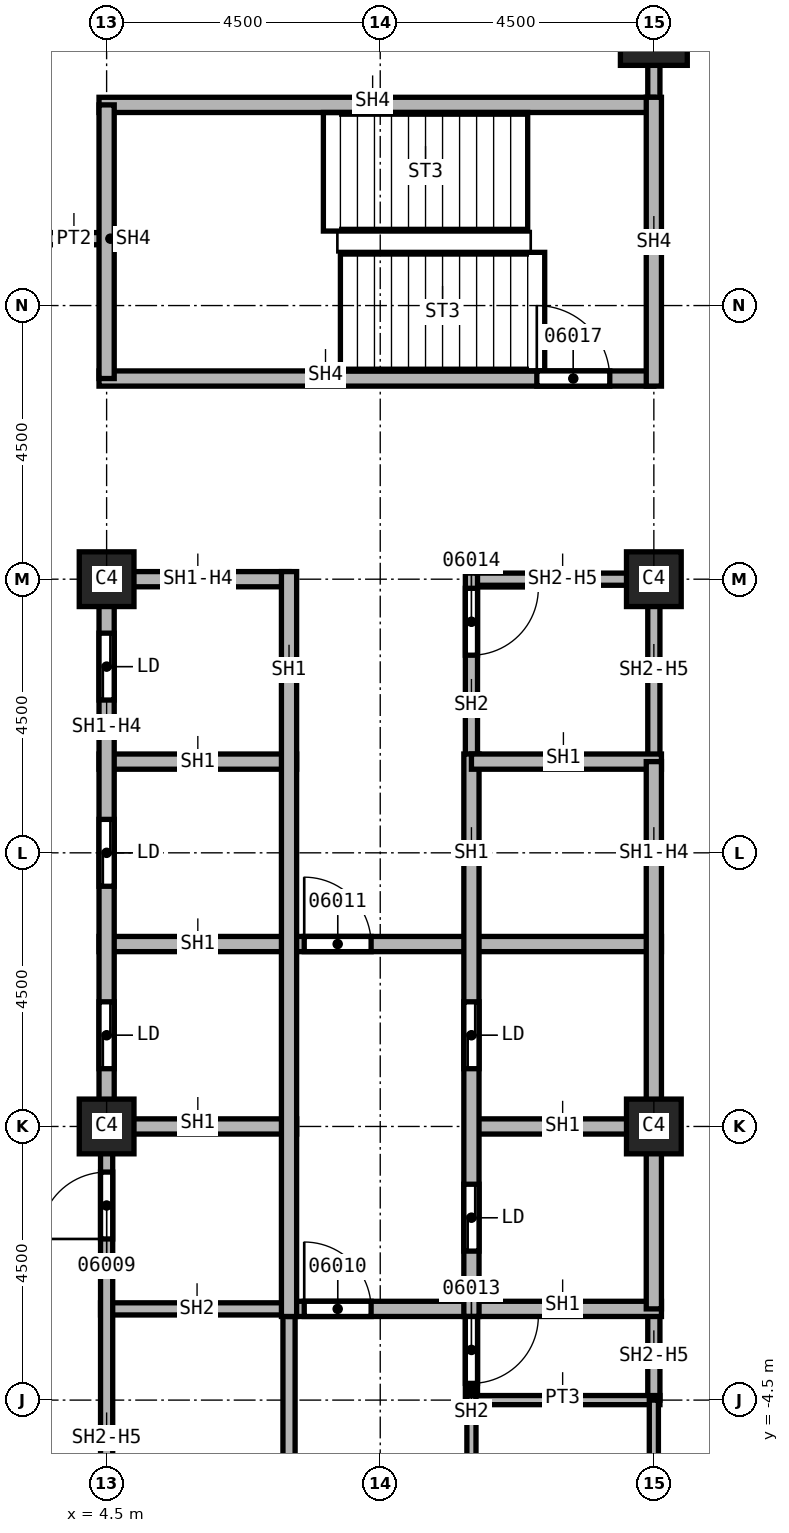
"""IFC4 building model, lengths in metres.
Left out: names, types, materials, properties, quantities, classifications, styles, units other than length and angle.
Written with IfcOpenShell. Run it as: python <this file> out.ifc"""

import sys

from ifc_helpers import new_model, si_unit, direction, frame, frame_2d, origin, origin_2d, place, context, subcontext, project, spatial, rectangle, extrude, element, fill, save


model = new_model("IFC4")
c1 = context("Model", 3, precision=1e-05, world=origin(), true_north=direction((0.0, 1.0)))
c2 = subcontext(c1, "Body", "Model", "MODEL_VIEW")
j1 = project(units=[si_unit("LENGTHUNIT", "METRE"), si_unit("PLANEANGLEUNIT", "RADIAN")], contexts=[c1])
p1 = place(None, origin())
s1 = spatial("IfcSite", under=j1, at=p1, CompositionType="ELEMENT")
p2 = place(p1, origin())
s2 = spatial("IfcBuilding", under=s1, at=p2, CompositionType="ELEMENT")
p3 = place(p2, frame((0.0, 0.0, 130.0)))
s3 = spatial("IfcBuildingStorey", under=s2, at=p3, CompositionType="ELEMENT", Elevation=130.0)
p4 = place(p3, frame((13.5, 18.0, 0.0), z_axis=(0.0, 0.0, 1.0), x_axis=(1.0, 0.0, 0.0)))
e1 = element("IfcColumn", 1, at=p4, inside=s3, PredefinedType="COLUMN", context=c2, shape_type="SweptSolid", body=[
    extrude(rectangle(XDim=1.1, YDim=1.1, at=origin_2d()), origin(), (0.0, 0.0, 1.0), 3.7),
])
for number, where, z_axis, x_axis in (
    (2, (4.5, 0.0, 0.0), (0.0, 0.0, 1.0), (1.0, 0.0, 0.0)),
    (3, (4.5, 9.0, 0.0), (0.0, 0.0, 1.0), (1.0, 0.0, 0.0)),
    (4, (13.5, 0.0, 0.0), (0.0, 0.0, 1.0), (1.0, 0.0, 0.0)),
    (5, (13.5, 9.0, 0.0), (0.0, 0.0, 1.0), (1.0, 0.0, 0.0)),
):
    element("IfcColumn", number, at=place(p3, frame(where, z_axis=z_axis, x_axis=x_axis)), inside=s3, PredefinedType="COLUMN", context=c2, shape_type="SweptSolid", body=[
        extrude(rectangle(XDim=0.9, YDim=0.9, at=origin_2d()), origin(), (0.0, 0.0, 1.0), 3.7),
    ])
p5 = place(p3, frame((3.55, 14.6, 0.0), z_axis=(0.0, 0.0, 1.0), x_axis=(1.0, 0.0, 0.0)))
e6 = element("IfcWall", 6, at=p5, inside=s3, PredefinedType="PARTITIONING", context=c2, shape_type="SweptSolid", body=[
    extrude(rectangle(XDim=0.95, YDim=0.2, at=frame_2d((0.475, 0.0))), origin(), (0.0, 0.0, 1.0), 3.7),
])
p6 = place(p3, frame((13.5, 16.675, 0.0), z_axis=(0.0, 0.0, 1.0), x_axis=(0.0, 1.0, 0.0)))
e7 = element("IfcWall", 7, at=p6, inside=s3, PredefinedType="PARTITIONING", context=c2, shape_type="SweptSolid", body=[
    extrude(rectangle(XDim=6.375, YDim=0.2, at=frame_2d((3.188, 0.0))), origin(), (0.0, 0.0, 1.0), 3.7),
])
p7 = place(p6, frame((2.2, 0.0, 0.0)))
e8 = element("IfcOpeningElement", 8, at=p7, cuts=e7, PredefinedType="OPENING", context=c2, shape_type="SweptSolid", body=[
    extrude(rectangle(XDim=1.0, YDim=2.1, at=frame_2d((0.5, 1.05))), frame((0.0, 0.1, 0.0), z_axis=(0.0, -1.0, 0.0), x_axis=(1.0, 0.0, 0.0)), (0.0, 0.0, 1.0), 0.2),
])
p8 = place(p3, frame((4.4, -3.0, 0.0), z_axis=(0.0, 0.0, 1.0), x_axis=(1.0, 0.0, 0.0)))
e9 = element("IfcWall", 9, at=p8, inside=s3, PredefinedType="SOLIDWALL", context=c2, shape_type="SweptSolid", body=[
    extrude(rectangle(XDim=3.225, YDim=0.2, at=frame_2d((1.613, 0.0))), origin(), (0.0, 0.0, 1.0), 3.7),
])
p9 = place(p3, frame((4.5, -9.1, 0.0), z_axis=(0.0, 0.0, 1.0), x_axis=(0.0, 1.0, 0.0)))
e10 = element("IfcWall", 10, at=p9, inside=s3, PredefinedType="SOLIDWALL", context=c2, shape_type="SweptSolid", body=[
    extrude(rectangle(XDim=9.1, YDim=0.2, at=frame_2d((4.55, 0.0))), origin(), (0.0, 0.0, 1.0), 2.938),
])
p10 = place(p9, frame((0.85, 0.0, 0.0)))
e11 = element("IfcOpeningElement", 11, at=p10, cuts=e10, PredefinedType="OPENING", context=c2, shape_type="SweptSolid", body=[
    extrude(rectangle(XDim=1.1, YDim=2.1, at=frame_2d((0.55, 1.05))), frame((0.0, 0.1, 0.0), z_axis=(0.0, -1.0, 0.0), x_axis=(1.0, 0.0, 0.0)), (0.0, 0.0, 1.0), 0.2),
])
p11 = place(p9, frame((7.25, 0.0, 0.0)))
e12 = element("IfcOpeningElement", 12, at=p11, cuts=e10, PredefinedType="OPENING", context=c2, shape_type="SweptSolid", body=[
    extrude(rectangle(XDim=1.1, YDim=2.1, at=frame_2d((0.55, 1.05))), frame((0.0, 0.1, 0.0), z_axis=(0.0, -1.0, 0.0), x_axis=(1.0, 0.0, 0.0)), (0.0, 0.0, 1.0), 0.2),
])
p12 = place(p3, frame((7.5, -2.875, 0.0), z_axis=(0.0, 0.0, 1.0), x_axis=(0.0, -1.0, 0.0)))
e13 = element("IfcWall", 13, at=p12, inside=s3, PredefinedType="SOLIDWALL", context=c2, shape_type="SweptSolid", body=[
    extrude(rectangle(XDim=6.225, YDim=0.2, at=frame_2d((3.113, 0.0))), origin(), (0.0, 0.0, 1.0), 3.7),
])
p13 = place(p3, frame((10.5, -2.875, 0.0), z_axis=(0.0, 0.0, 1.0), x_axis=(0.0, -1.0, 0.0)))
e14 = element("IfcWall", 14, at=p13, inside=s3, PredefinedType="SOLIDWALL", context=c2, shape_type="SweptSolid", body=[
    extrude(rectangle(XDim=1.7, YDim=0.2, at=frame_2d((0.85, 0.0))), origin(), (0.0, 0.0, 1.0), 3.7),
])
p14 = place(p13, frame((0.25, 0.0, 0.0)))
e15 = element("IfcOpeningElement", 15, at=p14, cuts=e14, PredefinedType="OPENING", context=c2, shape_type="SweptSolid", body=[
    extrude(rectangle(XDim=1.1, YDim=2.1, at=frame_2d((0.55, 1.05))), frame((0.0, 0.1, 0.0), z_axis=(0.0, -1.0, 0.0), x_axis=(1.0, 0.0, 0.0)), (0.0, 0.0, 1.0), 0.2),
])
p15 = place(p3, frame((10.5, 9.0, 0.0), z_axis=(0.0, 0.0, 1.0), x_axis=(1.0, 0.0, 0.0)))
e16 = element("IfcWall", 16, at=p15, inside=s3, PredefinedType="SOLIDWALL", context=c2, shape_type="SweptSolid", body=[
    extrude(rectangle(XDim=3.0, YDim=0.2, at=frame_2d((1.5, 0.0))), origin(), (0.0, 0.0, 1.0), 2.938),
])
p16 = place(p3, frame((10.5, 9.1, 0.0), z_axis=(0.0, 0.0, 1.0), x_axis=(0.0, -1.0, 0.0)))
e17 = element("IfcWall", 17, at=p16, inside=s3, PredefinedType="SOLIDWALL", context=c2, shape_type="SweptSolid", body=[
    extrude(rectangle(XDim=3.225, YDim=0.2, at=frame_2d((1.613, 0.0))), origin(), (0.0, 0.0, 1.0), 3.7),
])
p17 = place(p16, frame((0.25, 0.0, 0.0)))
e18 = element("IfcOpeningElement", 18, at=p17, cuts=e17, PredefinedType="OPENING", context=c2, shape_type="SweptSolid", body=[
    extrude(rectangle(XDim=1.1, YDim=2.1, at=frame_2d((0.55, 1.05))), frame((0.0, 0.1, 0.0), z_axis=(0.0, -1.0, 0.0), x_axis=(1.0, 0.0, 0.0)), (0.0, 0.0, 1.0), 0.2),
])
p18 = place(p3, frame((13.5, -3.0, 0.0), z_axis=(0.0, 0.0, 1.0), x_axis=(0.0, -1.0, 0.0)))
e19 = element("IfcWall", 19, at=p18, inside=s3, PredefinedType="SOLIDWALL", context=c2, shape_type="SweptSolid", body=[
    extrude(rectangle(XDim=1.5, YDim=0.2, at=frame_2d((0.75, 0.0))), origin(), (0.0, 0.0, 1.0), 2.938),
])
p19 = place(p3, frame((13.5, 9.1, 0.0), z_axis=(0.0, 0.0, 1.0), x_axis=(0.0, -1.0, 0.0)))
e20 = element("IfcWall", 20, at=p19, inside=s3, PredefinedType="SOLIDWALL", context=c2, shape_type="SweptSolid", body=[
    extrude(rectangle(XDim=3.1, YDim=0.2, at=frame_2d((1.55, 0.0))), origin(), (0.0, 0.0, 1.0), 2.938),
])
p20 = place(p3, frame((4.375, 0.0, 0.0), z_axis=(0.0, 0.0, 1.0), x_axis=(1.0, 0.0, 0.0)))
e21 = element("IfcWall", 21, at=p20, inside=s3, PredefinedType="SOLIDWALL", context=c2, shape_type="SweptSolid", body=[
    extrude(rectangle(XDim=3.25, YDim=0.25, at=frame_2d((1.625, 0.0))), origin(), (0.0, 0.0, 1.0), 3.7),
])
p21 = place(p3, frame((4.375, 3.0, 0.0), z_axis=(0.0, 0.0, 1.0), x_axis=(1.0, 0.0, 0.0)))
e22 = element("IfcWall", 22, at=p21, inside=s3, PredefinedType="SOLIDWALL", context=c2, shape_type="SweptSolid", body=[
    extrude(rectangle(XDim=9.25, YDim=0.25, at=frame_2d((4.625, 0.0))), origin(), (0.0, 0.0, 1.0), 3.7),
])
p22 = place(p21, frame((3.375, 0.0, 0.0)))
e23 = element("IfcOpeningElement", 23, at=p22, cuts=e22, PredefinedType="OPENING", context=c2, shape_type="SweptSolid", body=[
    extrude(rectangle(XDim=1.1, YDim=2.1, at=frame_2d((0.55, 1.05))), frame((0.0, 0.125, 0.0), z_axis=(0.0, -1.0, 0.0), x_axis=(1.0, 0.0, 0.0)), (0.0, 0.0, 1.0), 0.25),
])
p23 = place(p3, frame((4.375, 6.0, 0.0), z_axis=(0.0, 0.0, 1.0), x_axis=(1.0, 0.0, 0.0)))
e24 = element("IfcWall", 24, at=p23, inside=s3, PredefinedType="SOLIDWALL", context=c2, shape_type="SweptSolid", body=[
    extrude(rectangle(XDim=3.25, YDim=0.25, at=frame_2d((1.625, 0.0))), origin(), (0.0, 0.0, 1.0), 3.7),
])
p24 = place(p3, frame((4.5, 0.0, 0.0), z_axis=(0.0, 0.0, 1.0), x_axis=(0.0, 1.0, 0.0)))
e25 = element("IfcWall", 25, at=p24, inside=s3, PredefinedType="SOLIDWALL", context=c2, shape_type="SweptSolid", body=[
    extrude(rectangle(XDim=9.125, YDim=0.25, at=frame_2d((4.562, 0.0))), origin(), (0.0, 0.0, 1.0), 2.938),
])
p25 = place(p24, frame((0.95, 0.0, 0.0)))
e26 = element("IfcOpeningElement", 26, at=p25, cuts=e25, PredefinedType="OPENING", context=c2, shape_type="SweptSolid", body=[
    extrude(rectangle(XDim=1.1, YDim=2.1, at=frame_2d((0.55, 1.05))), frame((0.0, 0.125, 0.0), z_axis=(0.0, -1.0, 0.0), x_axis=(1.0, 0.0, 0.0)), (0.0, 0.0, 1.0), 0.25),
])
p26 = place(p24, frame((3.95, 0.0, 0.0)))
e27 = element("IfcOpeningElement", 27, at=p26, cuts=e25, PredefinedType="OPENING", context=c2, shape_type="SweptSolid", body=[
    extrude(rectangle(XDim=1.1, YDim=2.1, at=frame_2d((0.55, 1.05))), frame((0.0, 0.125, 0.0), z_axis=(0.0, -1.0, 0.0), x_axis=(1.0, 0.0, 0.0)), (0.0, 0.0, 1.0), 0.25),
])
p27 = place(p24, frame((7.012, 0.0, 0.0)))
e28 = element("IfcOpeningElement", 28, at=p27, cuts=e25, PredefinedType="OPENING", context=c2, shape_type="SweptSolid", body=[
    extrude(rectangle(XDim=1.1, YDim=2.1, at=frame_2d((0.55, 1.05))), frame((0.0, 0.125, 0.0), z_axis=(0.0, -1.0, 0.0), x_axis=(1.0, 0.0, 0.0)), (0.0, 0.0, 1.0), 0.25),
])
p28 = place(p3, frame((4.5, 9.0, 0.0), z_axis=(0.0, 0.0, 1.0), x_axis=(1.0, 0.0, 0.0)))
e29 = element("IfcWall", 29, at=p28, inside=s3, PredefinedType="SOLIDWALL", context=c2, shape_type="SweptSolid", body=[
    extrude(rectangle(XDim=3.0, YDim=0.25, at=frame_2d((1.5, 0.0))), origin(), (0.0, 0.0, 1.0), 2.938),
])
p29 = place(p3, frame((7.5, -3.0, 0.0), z_axis=(0.0, 0.0, 1.0), x_axis=(1.0, 0.0, 0.0)))
e30 = element("IfcWall", 30, at=p29, inside=s3, PredefinedType="SOLIDWALL", context=c2, shape_type="SweptSolid", body=[
    extrude(rectangle(XDim=6.125, YDim=0.25, at=frame_2d((3.062, 0.0))), origin(), (0.0, 0.0, 1.0), 3.7),
])
p30 = place(p29, frame((0.25, 0.0, 0.0)))
e31 = element("IfcOpeningElement", 31, at=p30, cuts=e30, PredefinedType="OPENING", context=c2, shape_type="SweptSolid", body=[
    extrude(rectangle(XDim=1.1, YDim=2.1, at=frame_2d((0.55, 1.05))), frame((0.0, 0.125, 0.0), z_axis=(0.0, -1.0, 0.0), x_axis=(1.0, 0.0, 0.0)), (0.0, 0.0, 1.0), 0.25),
])
p31 = place(p3, frame((7.5, 9.125, 0.0), z_axis=(0.0, 0.0, 1.0), x_axis=(0.0, -1.0, 0.0)))
e32 = element("IfcWall", 32, at=p31, inside=s3, PredefinedType="SOLIDWALL", context=c2, shape_type="SweptSolid", body=[
    extrude(rectangle(XDim=12.25, YDim=0.25, at=frame_2d((6.125, 0.0))), origin(), (0.0, 0.0, 1.0), 3.7),
])
p32 = place(p3, frame((10.5, 0.0, 0.0), z_axis=(0.0, 0.0, 1.0), x_axis=(1.0, 0.0, 0.0)))
e33 = element("IfcWall", 33, at=p32, inside=s3, PredefinedType="SOLIDWALL", context=c2, shape_type="SweptSolid", body=[
    extrude(rectangle(XDim=3.125, YDim=0.25, at=frame_2d((1.562, 0.0))), origin(), (0.0, 0.0, 1.0), 3.7),
])
p33 = place(p3, frame((10.5, 6.125, 0.0), z_axis=(0.0, 0.0, 1.0), x_axis=(0.0, -1.0, 0.0)))
e34 = element("IfcWall", 34, at=p33, inside=s3, PredefinedType="SOLIDWALL", context=c2, shape_type="SweptSolid", body=[
    extrude(rectangle(XDim=9.25, YDim=0.25, at=frame_2d((4.625, 0.0))), origin(), (0.0, 0.0, 1.0), 3.7),
])
p34 = place(p33, frame((7.075, 0.0, 0.0)))
e35 = element("IfcOpeningElement", 35, at=p34, cuts=e34, PredefinedType="OPENING", context=c2, shape_type="SweptSolid", body=[
    extrude(rectangle(XDim=1.1, YDim=2.1, at=frame_2d((0.55, 1.05))), frame((0.0, 0.125, 0.0), z_axis=(0.0, -1.0, 0.0), x_axis=(1.0, 0.0, 0.0)), (0.0, 0.0, 1.0), 0.25),
])
p35 = place(p33, frame((4.075, 0.0, 0.0)))
e36 = element("IfcOpeningElement", 36, at=p35, cuts=e34, PredefinedType="OPENING", context=c2, shape_type="SweptSolid", body=[
    extrude(rectangle(XDim=1.1, YDim=2.1, at=frame_2d((0.55, 1.05))), frame((0.0, 0.125, 0.0), z_axis=(0.0, -1.0, 0.0), x_axis=(1.0, 0.0, 0.0)), (0.0, 0.0, 1.0), 0.25),
])
p36 = place(p3, frame((10.5, 6.0, 0.0), z_axis=(0.0, 0.0, 1.0), x_axis=(1.0, 0.0, 0.0)))
e37 = element("IfcWall", 37, at=p36, inside=s3, PredefinedType="SOLIDWALL", context=c2, shape_type="SweptSolid", body=[
    extrude(rectangle(XDim=3.125, YDim=0.25, at=frame_2d((1.562, 0.0))), origin(), (0.0, 0.0, 1.0), 3.7),
])
p37 = place(p3, frame((13.5, 6.0, 0.0), z_axis=(0.0, 0.0, 1.0), x_axis=(0.0, -1.0, 0.0)))
e38 = element("IfcWall", 38, at=p37, inside=s3, PredefinedType="SOLIDWALL", context=c2, shape_type="SweptSolid", body=[
    extrude(rectangle(XDim=9.0, YDim=0.25, at=frame_2d((4.5, 0.0))), origin(), (0.0, 0.0, 1.0), 2.938),
])
p38 = place(p3, frame((4.375, 12.3, 0.0), z_axis=(0.0, 0.0, 1.0), x_axis=(1.0, 0.0, 0.0)))
e39 = element("IfcWall", 39, at=p38, inside=s3, PredefinedType="SOLIDWALL", context=c2, shape_type="SweptSolid", body=[
    extrude(rectangle(XDim=9.125, YDim=0.25, at=frame_2d((4.562, 0.0))), origin(), (0.0, 0.0, 1.0), 3.7),
])
p39 = place(p38, frame((7.2, 0.0, 0.0)))
e40 = element("IfcOpeningElement", 40, at=p39, cuts=e39, PredefinedType="OPENING", context=c2, shape_type="SweptSolid", body=[
    extrude(rectangle(XDim=1.2, YDim=2.1, at=frame_2d((0.6, 1.05))), frame((0.0, 0.125, 0.0), z_axis=(0.0, -1.0, 0.0), x_axis=(1.0, 0.0, 0.0)), (0.0, 0.0, 1.0), 0.25),
])
p40 = place(p3, frame((4.375, 16.8, 0.0), z_axis=(0.0, 0.0, 1.0), x_axis=(1.0, 0.0, 0.0)))
e41 = element("IfcWall", 41, at=p40, inside=s3, PredefinedType="SOLIDWALL", context=c2, shape_type="SweptSolid", body=[
    extrude(rectangle(XDim=9.125, YDim=0.25, at=frame_2d((4.562, 0.0))), origin(), (0.0, 0.0, 1.0), 3.7),
])
p41 = place(p3, frame((4.5, 12.3, 0.0), z_axis=(0.0, 0.0, 1.0), x_axis=(0.0, 1.0, 0.0)))
e42 = element("IfcWall", 42, at=p41, inside=s3, PredefinedType="SOLIDWALL", context=c2, shape_type="SweptSolid", body=[
    extrude(rectangle(XDim=4.5, YDim=0.25, at=frame_2d((2.25, 0.0))), origin(), (0.0, 0.0, 1.0), 3.7),
])
p42 = place(p3, frame((13.5, 12.175, 0.0), z_axis=(0.0, 0.0, 1.0), x_axis=(0.0, 1.0, 0.0)))
e43 = element("IfcWall", 43, at=p42, inside=s3, PredefinedType="SOLIDWALL", context=c2, shape_type="SweptSolid", body=[
    extrude(rectangle(XDim=4.75, YDim=0.25, at=frame_2d((2.375, 0.0))), origin(), (0.0, 0.0, 1.0), 3.7),
])
p43 = place(p3, frame((10.5, -4.5, 0.0), z_axis=(0.0, 0.0, 1.0), x_axis=(1.0, 0.0, 0.0)))
e44 = element("IfcWall", 44, at=p43, inside=s3, PredefinedType="PARTITIONING", context=c2, shape_type="SweptSolid", body=[
    extrude(rectangle(XDim=3.1, YDim=0.15, at=frame_2d((1.55, 0.0))), origin(), (0.0, 0.0, 1.0), 3.7),
])
p44 = place(p3, frame((10.5, -4.425, 0.0), z_axis=(0.0, 0.0, 1.0), x_axis=(0.0, -1.0, 0.0)))
e45 = element("IfcWall", 45, at=p44, inside=s3, PredefinedType="PARTITIONING", context=c2, shape_type="SweptSolid", body=[
    extrude(rectangle(XDim=4.65, YDim=0.15, at=frame_2d((2.325, 0.0))), origin(), (0.0, 0.0, 1.0), 3.7),
])
p45 = place(p44, frame((2.8, 0.0, 0.0)))
e46 = element("IfcOpeningElement", 46, at=p45, cuts=e45, PredefinedType="OPENING", context=c2, shape_type="SweptSolid", body=[
    extrude(rectangle(XDim=0.9, YDim=2.1, at=frame_2d((0.45, 1.05))), frame((0.0, 0.075, 0.0), z_axis=(0.0, -1.0, 0.0), x_axis=(1.0, 0.0, 0.0)), (0.0, 0.0, 1.0), 0.15),
])
p46 = place(p3, frame((13.5, -4.5, 0.0), z_axis=(0.0, 0.0, 1.0), x_axis=(0.0, -1.0, 0.0)))
e47 = element("IfcWall", 47, at=p46, inside=s3, PredefinedType="PARTITIONING", context=c2, shape_type="SweptSolid", body=[
    extrude(rectangle(XDim=4.575, YDim=0.15, at=frame_2d((2.288, 0.0))), origin(), (0.0, 0.0, 1.0), 2.938),
])
p47 = place(p11, origin())
e48 = element("IfcDoor", 48, at=p47, inside=s3, OperationType="SINGLE_SWING_RIGHT", PredefinedType="DOOR", context=c2, shape_type="SweptSolid", body=[
    extrude(rectangle(XDim=1.1, YDim=2.1, at=frame_2d((0.55, 1.05))), frame((0.0, 0.025, 0.0), z_axis=(0.0, -1.0, 0.0), x_axis=(1.0, 0.0, 0.0)), (0.0, 0.0, 1.0), 0.05),
])
fill(e12, e48)
p48 = place(p30, origin())
e49 = element("IfcDoor", 49, at=p48, inside=s3, OperationType="SINGLE_SWING_LEFT", PredefinedType="DOOR", context=c2, shape_type="SweptSolid", body=[
    extrude(rectangle(XDim=1.1, YDim=2.1, at=frame_2d((0.55, 1.05))), frame((0.0, 0.025, 0.0), z_axis=(0.0, -1.0, 0.0), x_axis=(1.0, 0.0, 0.0)), (0.0, 0.0, 1.0), 0.05),
])
fill(e31, e49)
p49 = place(p22, origin())
e50 = element("IfcDoor", 50, at=p49, inside=s3, OperationType="SINGLE_SWING_RIGHT", PredefinedType="DOOR", context=c2, shape_type="SweptSolid", body=[
    extrude(rectangle(XDim=1.1, YDim=2.1, at=frame_2d((0.55, 1.05))), frame((0.0, 0.025, 0.0), z_axis=(0.0, -1.0, 0.0), x_axis=(1.0, 0.0, 0.0)), (0.0, 0.0, 1.0), 0.05),
])
fill(e23, e50)
p50 = place(p14, origin())
e51 = element("IfcDoor", 51, at=p50, inside=s3, OperationType="SINGLE_SWING_RIGHT", PredefinedType="DOOR", context=c2, shape_type="SweptSolid", body=[
    extrude(rectangle(XDim=1.1, YDim=2.1, at=frame_2d((0.55, 1.05))), frame((0.0, 0.025, 0.0), z_axis=(0.0, -1.0, 0.0), x_axis=(1.0, 0.0, 0.0)), (0.0, 0.0, 1.0), 0.05),
])
fill(e15, e51)
p51 = place(p17, origin())
e52 = element("IfcDoor", 52, at=p51, inside=s3, OperationType="SINGLE_SWING_LEFT", PredefinedType="DOOR", context=c2, shape_type="SweptSolid", body=[
    extrude(rectangle(XDim=1.1, YDim=2.1, at=frame_2d((0.55, 1.05))), frame((0.0, 0.025, 0.0), z_axis=(0.0, -1.0, 0.0), x_axis=(1.0, 0.0, 0.0)), (0.0, 0.0, 1.0), 0.05),
])
fill(e18, e52)
p52 = place(p39, origin())
e53 = element("IfcDoor", 53, at=p52, inside=s3, OperationType="SINGLE_SWING_RIGHT", PredefinedType="DOOR", context=c2, shape_type="SweptSolid", body=[
    extrude(rectangle(XDim=1.2, YDim=2.1, at=frame_2d((0.6, 1.05))), frame((0.0, 0.025, 0.0), z_axis=(0.0, -1.0, 0.0), x_axis=(1.0, 0.0, 0.0)), (0.0, 0.0, 1.0), 0.05),
])
fill(e40, e53)
p53 = place(p25, origin())
e54 = element("IfcDoor", 54, at=p53, inside=s3, OperationType="SLIDING_TO_LEFT", PredefinedType="DOOR", context=c2, shape_type="SweptSolid", body=[
    extrude(rectangle(XDim=1.1, YDim=2.1, at=frame_2d((0.55, 1.05))), frame((0.0, 0.025, 0.0), z_axis=(0.0, -1.0, 0.0), x_axis=(1.0, 0.0, 0.0)), (0.0, 0.0, 1.0), 0.05),
])
fill(e26, e54)
p54 = place(p26, origin())
e55 = element("IfcDoor", 55, at=p54, inside=s3, OperationType="SLIDING_TO_LEFT", PredefinedType="DOOR", context=c2, shape_type="SweptSolid", body=[
    extrude(rectangle(XDim=1.1, YDim=2.1, at=frame_2d((0.55, 1.05))), frame((0.0, 0.025, 0.0), z_axis=(0.0, -1.0, 0.0), x_axis=(1.0, 0.0, 0.0)), (0.0, 0.0, 1.0), 0.05),
])
fill(e27, e55)
p55 = place(p27, origin())
e56 = element("IfcDoor", 56, at=p55, inside=s3, OperationType="SLIDING_TO_LEFT", PredefinedType="DOOR", context=c2, shape_type="SweptSolid", body=[
    extrude(rectangle(XDim=1.1, YDim=2.1, at=frame_2d((0.55, 1.05))), frame((0.0, 0.025, 0.0), z_axis=(0.0, -1.0, 0.0), x_axis=(1.0, 0.0, 0.0)), (0.0, 0.0, 1.0), 0.05),
])
fill(e28, e56)
p56 = place(p34, origin())
e57 = element("IfcDoor", 57, at=p56, inside=s3, OperationType="SLIDING_TO_LEFT", PredefinedType="DOOR", context=c2, shape_type="SweptSolid", body=[
    extrude(rectangle(XDim=1.1, YDim=2.1, at=frame_2d((0.55, 1.05))), frame((0.0, 0.025, 0.0), z_axis=(0.0, -1.0, 0.0), x_axis=(1.0, 0.0, 0.0)), (0.0, 0.0, 1.0), 0.05),
])
fill(e35, e57)
p57 = place(p35, origin())
e58 = element("IfcDoor", 58, at=p57, inside=s3, OperationType="SLIDING_TO_LEFT", PredefinedType="DOOR", context=c2, shape_type="SweptSolid", body=[
    extrude(rectangle(XDim=1.1, YDim=2.1, at=frame_2d((0.55, 1.05))), frame((0.0, 0.025, 0.0), z_axis=(0.0, -1.0, 0.0), x_axis=(1.0, 0.0, 0.0)), (0.0, 0.0, 1.0), 0.05),
])
fill(e36, e58)
save(model, sys.argv[1])
